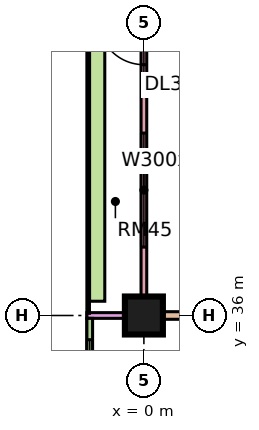
"""IFC4 building model, lengths in metres.
Left out: names, types, materials, properties, quantities, classifications, styles, units other than length and angle.
Written with IfcOpenShell. Run it as: python <this file> out.ifc"""

import sys

from ifc_helpers import new_model, si_unit, direction, frame, frame_2d, origin, origin_2d, place, context, subcontext, project, spatial, rectangle, extrude, element, fill, save


model = new_model("IFC4")
c1 = context("Model", 3, precision=1e-05, world=origin(), true_north=direction((0.0, 1.0)))
c2 = subcontext(c1, "Body", "Model", "MODEL_VIEW")
j1 = project(units=[si_unit("LENGTHUNIT", "METRE"), si_unit("PLANEANGLEUNIT", "RADIAN")], contexts=[c1])
p1 = place(None, origin())
s1 = spatial("IfcSite", under=j1, at=p1, CompositionType="ELEMENT")
p2 = place(p1, origin())
s2 = spatial("IfcBuilding", under=s1, at=p2, CompositionType="ELEMENT")
p3 = place(p2, frame((0.0, 0.0, 136.9)))
s3 = spatial("IfcBuildingStorey", under=s2, at=p3, CompositionType="ELEMENT", Elevation=136.9)
p4 = place(p3, frame((0.0, 36.0, 0.0), z_axis=(0.0, 0.0, 1.0), x_axis=(1.0, 0.0, 0.0)))
e1 = element("IfcColumn", 1, at=p4, inside=s3, PredefinedType="COLUMN", context=c2, shape_type="SweptSolid", body=[
    extrude(rectangle(XDim=1.0, YDim=1.0, at=origin_2d()), origin(), (0.0, 0.0, 1.0), 3.75),
])
p5 = place(p3, frame((0.0, 47.925, 0.0), z_axis=(0.0, 0.0, 1.0), x_axis=(0.0, -1.0, 0.0)))
e2 = element("IfcWall", 2, at=p5, inside=s3, PredefinedType="SOLIDWALL", context=c2, shape_type="SweptSolid", body=[
    extrude(rectangle(XDim=11.85, YDim=0.15, at=frame_2d((5.925, 0.0))), origin(), (0.0, 0.0, 1.0), 3.3),
])
p6 = place(p5, frame((0.562, 0.0, 0.45)))
e3 = element("IfcOpeningElement", 3, at=p6, cuts=e2, PredefinedType="OPENING", context=c2, shape_type="SweptSolid", body=[
    extrude(rectangle(XDim=1.2, YDim=2.4, at=frame_2d((0.6, 1.2))), frame((0.0, 0.085, 0.0), z_axis=(0.0, -1.0, 0.0), x_axis=(1.0, 0.0, 0.0)), (0.0, 0.0, 1.0), 0.17),
])
p7 = place(p5, frame((4.125, 0.0, 0.0)))
e4 = element("IfcOpeningElement", 4, at=p7, cuts=e2, PredefinedType="OPENING", context=c2, shape_type="SweptSolid", body=[
    extrude(rectangle(XDim=1.2, YDim=2.4, at=frame_2d((0.6, 1.2))), frame((0.0, 0.085, 0.0), z_axis=(0.0, -1.0, 0.0), x_axis=(1.0, 0.0, 0.0)), (0.0, 0.0, 1.0), 0.17),
])
p8 = place(p5, frame((7.125, 0.0, 0.45)))
e5 = element("IfcOpeningElement", 5, at=p8, cuts=e2, PredefinedType="OPENING", context=c2, shape_type="SweptSolid", body=[
    extrude(rectangle(XDim=3.0, YDim=2.4, at=frame_2d((1.5, 1.2))), frame((0.0, 0.085, 0.0), z_axis=(0.0, -1.0, 0.0), x_axis=(1.0, 0.0, 0.0)), (0.0, 0.0, 1.0), 0.17),
])
p9 = place(p3, frame((-1.5, 36.0, 0.0), z_axis=(0.0, 0.0, 1.0), x_axis=(1.0, 0.0, 0.0)))
e6 = element("IfcWall", 6, at=p9, inside=s3, PredefinedType="SOLIDWALL", context=c2, shape_type="SweptSolid", body=[
    extrude(rectangle(XDim=1.5, YDim=0.15, at=frame_2d((0.75, 0.0))), origin(), (0.0, 0.0, 1.0), 3.3),
])
p10 = place(p3, frame((-1.425, 35.925, 0.0), z_axis=(0.0, 0.0, 1.0), x_axis=(0.0, -1.0, 0.0)))
e7 = element("IfcWall", 7, at=p10, inside=s3, PredefinedType="SOLIDWALL", context=c2, shape_type="SweptSolid", body=[
    extrude(rectangle(XDim=11.85, YDim=0.15, at=frame_2d((5.925, 0.0))), origin(), (0.0, 0.0, 1.0), 3.3),
])
p11 = place(p10, frame((0.562, 0.0, 0.45)))
e8 = element("IfcOpeningElement", 8, at=p11, cuts=e7, PredefinedType="OPENING", context=c2, shape_type="SweptSolid", body=[
    extrude(rectangle(XDim=1.8, YDim=2.4, at=frame_2d((0.9, 1.2))), frame((0.0, 0.085, 0.0), z_axis=(0.0, -1.0, 0.0), x_axis=(1.0, 0.0, 0.0)), (0.0, 0.0, 1.0), 0.17),
])
p12 = place(p10, frame((4.425, 0.0, 0.45)))
e9 = element("IfcOpeningElement", 9, at=p12, cuts=e7, PredefinedType="OPENING", context=c2, shape_type="SweptSolid", body=[
    extrude(rectangle(XDim=3.0, YDim=2.4, at=frame_2d((1.5, 1.2))), frame((0.0, 0.085, 0.0), z_axis=(0.0, -1.0, 0.0), x_axis=(1.0, 0.0, 0.0)), (0.0, 0.0, 1.0), 0.17),
])
p13 = place(p10, frame((9.488, 0.0, 0.45)))
e10 = element("IfcOpeningElement", 10, at=p13, cuts=e7, PredefinedType="OPENING", context=c2, shape_type="SweptSolid", body=[
    extrude(rectangle(XDim=1.8, YDim=2.4, at=frame_2d((0.9, 1.2))), frame((0.0, 0.085, 0.0), z_axis=(0.0, -1.0, 0.0), x_axis=(1.0, 0.0, 0.0)), (0.0, 0.0, 1.0), 0.17),
])
p14 = place(p3, frame((-1.229, 47.625, 0.0), z_axis=(0.0, 0.0, 1.0), x_axis=(0.0, -1.0, 0.0)))
e11 = element("IfcWall", 11, at=p14, inside=s3, PredefinedType="SOLIDWALL", context=c2, shape_type="SweptSolid", body=[
    extrude(rectangle(XDim=11.25, YDim=0.4, at=frame_2d((5.625, 0.0))), origin(), (0.0, 0.0, 1.0), 0.7),
])
e12 = element("IfcWall", 12, at=p4, inside=s3, PredefinedType="PARTITIONING", context=c2, shape_type="SweptSolid", body=[
    extrude(rectangle(XDim=12.4, YDim=0.2, at=frame_2d((6.2, 0.0))), origin(), (0.0, 0.0, 1.0), 3.3),
])
p15 = place(p3, frame((0.074, 42.0, 0.0), z_axis=(0.0, 0.0, 1.0), x_axis=(1.0, 0.0, 0.0)))
e13 = element("IfcWall", 13, at=p15, inside=s3, PredefinedType="PARTITIONING", context=c2, shape_type="SweptSolid", body=[
    extrude(rectangle(XDim=6.351, YDim=0.1, at=frame_2d((3.176, 0.0))), origin(), (0.0, 0.0, 1.0), 3.3),
])
p16 = place(p7, frame((1.2, 0.0, 0.0), z_axis=(0.0, 0.0, 1.0), x_axis=(-1.0, 0.0, 0.0)))
e14 = element("IfcDoor", 14, at=p16, inside=s3, OperationType="DOUBLE_DOOR_SINGLE_SWING", PredefinedType="DOOR", context=c2, shape_type="SweptSolid", body=[
    extrude(rectangle(XDim=1.2, YDim=2.4, at=frame_2d((0.6, 1.2))), frame((0.0, 0.025, 0.0), z_axis=(0.0, -1.0, 0.0), x_axis=(1.0, 0.0, 0.0)), (0.0, 0.0, 1.0), 0.05),
])
fill(e4, e14)
p17 = place(p8, origin())
e15 = element("IfcWindow", 15, at=p17, inside=s3, PartitioningType="SINGLE_PANEL", PredefinedType="WINDOW", context=c2, shape_type="SweptSolid", body=[
    extrude(rectangle(XDim=3.0, YDim=2.4, at=frame_2d((1.5, 1.2))), frame((0.0, 0.03, 0.0), z_axis=(0.0, -1.0, 0.0), x_axis=(1.0, 0.0, 0.0)), (0.0, 0.0, 1.0), 0.06),
])
fill(e5, e15)
p18 = place(p11, origin())
e16 = element("IfcWindow", 16, at=p18, inside=s3, PartitioningType="SINGLE_PANEL", PredefinedType="WINDOW", context=c2, shape_type="SweptSolid", body=[
    extrude(rectangle(XDim=1.8, YDim=2.4, at=frame_2d((0.9, 1.2))), frame((0.0, 0.03, 0.0), z_axis=(0.0, -1.0, 0.0), x_axis=(1.0, 0.0, 0.0)), (0.0, 0.0, 1.0), 0.06),
])
fill(e8, e16)
save(model, sys.argv[1])
